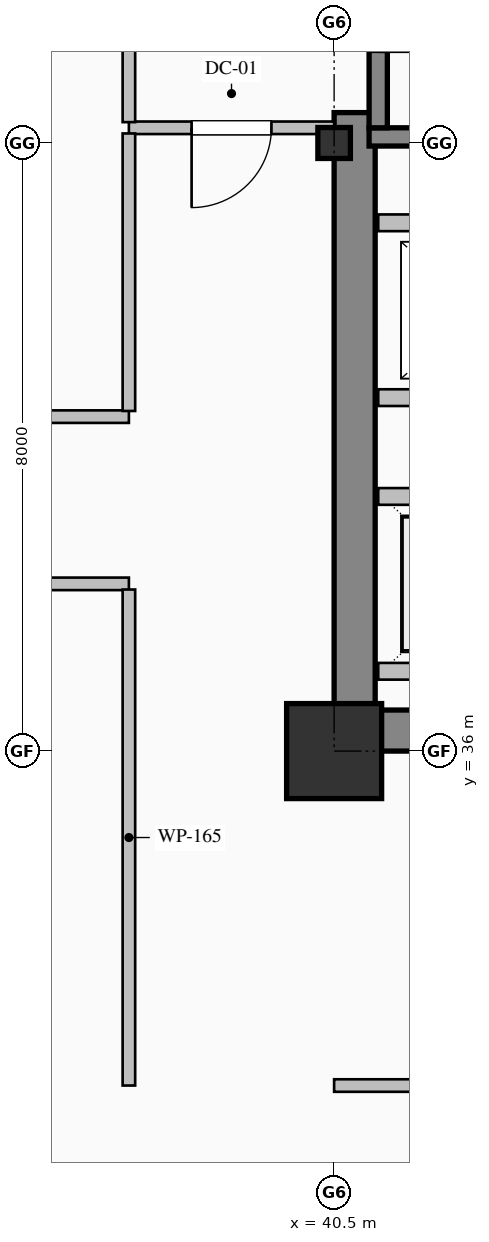
"""IFC4 building model, lengths in metres.
Left out: names, types, materials, properties, quantities, classifications, styles, units other than length and angle.
Written with IfcOpenShell. Run it as: python <this file> out.ifc"""

import sys

from ifc_helpers import new_model, si_unit, direction, frame, frame_2d, origin, origin_2d, place, context, subcontext, project, spatial, rectangle, hollow_rectangle, i_section, extrude, element, fill, save


model = new_model("IFC4")
c1 = context("Model", 3, precision=1e-05, world=origin(), true_north=direction((0.0, 1.0)))
c2 = subcontext(c1, "Body", "Model", "MODEL_VIEW")
j1 = project(units=[si_unit("LENGTHUNIT", "METRE"), si_unit("PLANEANGLEUNIT", "RADIAN")], contexts=[c1])
p1 = place(None, origin())
s1 = spatial("IfcSite", under=j1, at=p1, CompositionType="ELEMENT")
p2 = place(p1, origin())
s2 = spatial("IfcBuilding", under=s1, at=p2, CompositionType="ELEMENT")
p3 = place(p2, frame((0.0, 0.0, 32.2)))
s3 = spatial("IfcBuildingStorey", under=s2, at=p3, CompositionType="ELEMENT", Elevation=32.2)
p4 = place(p3, frame((40.77, 36.54, 0.0), z_axis=(0.0, 0.0, 1.0), x_axis=(0.0, 1.0, 0.0)))
e1 = element("IfcWall", 1, at=p4, inside=s3, PredefinedType="SHEAR", context=c2, shape_type="SweptSolid", body=[
    extrude(rectangle(XDim=7.86, YDim=0.54, at=frame_2d((3.93, 0.0))), origin(), (0.0, 0.0, 1.0), 3.75),
])
p5 = place(p3, frame((40.5, 36.27, 0.0), z_axis=(0.0, 0.0, 1.0), x_axis=(1.0, 0.0, 0.0)))
e2 = element("IfcWall", 2, at=p5, inside=s3, PredefinedType="SHEAR", context=c2, shape_type="SweptSolid", body=[
    extrude(rectangle(XDim=1.7, YDim=0.54, at=frame_2d((0.85, 0.0))), origin(), (0.0, 0.0, 1.0), 3.75),
])
p6 = place(p3, frame((40.5, 36.0, 0.0), z_axis=(0.0, 0.0, 1.0), x_axis=(1.0, 0.0, 0.0)))
e3 = element("IfcColumn", 3, at=p6, inside=s3, PredefinedType="COLUMN", context=c2, shape_type="SweptSolid", body=[
    extrude(hollow_rectangle(XDim=1.25, YDim=1.25, WallThickness=0.045, at=origin_2d()), origin(), (0.0, 0.0, 1.0), 4.0),
])
p7 = place(p3, frame((40.5, 44.0, 0.0), z_axis=(0.0, 0.0, 1.0), x_axis=(1.0, 0.0, 0.0)))
e4 = element("IfcColumn", 4, at=p7, inside=s3, PredefinedType="COLUMN", context=c2, shape_type="SweptSolid", body=[
    extrude(i_section(OverallWidth=0.407, OverallDepth=0.428, WebThickness=0.02, FlangeThickness=0.035, FilletRadius=0.022, at=origin_2d()), origin(), (0.0, 0.0, 1.0), 4.0),
])
p8 = place(p3, frame((49.04, 44.08, 0.0), z_axis=(0.0, 0.0, 1.0), x_axis=(-1.0, 0.0, 0.0)))
e5 = element("IfcWall", 5, at=p8, inside=s3, PredefinedType="SOLIDWALL", context=c2, shape_type="SweptSolid", body=[
    extrude(rectangle(XDim=8.08, YDim=0.24, at=frame_2d((4.04, 0.0))), origin(), (0.0, 0.0, 1.0), 4.0),
])
p9 = place(p3, frame((41.08, 47.35, 0.0), z_axis=(0.0, 0.0, 1.0), x_axis=(0.0, -1.0, 0.0)))
e6 = element("IfcWall", 6, at=p9, inside=s3, PredefinedType="SOLIDWALL", context=c2, shape_type="SweptSolid", body=[
    extrude(rectangle(XDim=3.15, YDim=0.24, at=frame_2d((1.575, 0.0))), origin(), (0.0, 0.0, 1.0), 4.0),
])
p10 = place(p9, frame((1.0, 0.0, 0.0)))
e7 = element("IfcOpeningElement", 7, at=p10, cuts=e6, PredefinedType="OPENING", context=c2, shape_type="SweptSolid", body=[
    extrude(rectangle(XDim=1.15, YDim=2.2, at=frame_2d((0.575, 1.1))), frame((0.0, 0.13, 0.0), z_axis=(0.0, -1.0, 0.0), x_axis=(1.0, 0.0, 0.0)), (0.0, 0.0, 1.0), 0.26),
])
p11 = place(p3, frame((49.32, 37.05, 0.0), z_axis=(0.0, 0.0, 1.0), x_axis=(-1.0, 0.0, 0.0)))
e8 = element("IfcWall", 8, at=p11, inside=s3, PredefinedType="PARTITIONING", context=c2, shape_type="SweptSolid", body=[
    extrude(rectangle(XDim=8.24, YDim=0.22, at=frame_2d((4.12, 0.0))), origin(), (0.0, 0.0, 1.0), 3.75),
])
p12 = place(p11, frame((6.37, 0.0, 0.0)))
e9 = element("IfcOpeningElement", 9, at=p12, cuts=e8, PredefinedType="OPENING", context=c2, shape_type="SweptSolid", body=[
    extrude(rectangle(XDim=1.1, YDim=2.2, at=frame_2d((0.55, 1.1))), frame((0.0, 0.12, 0.0), z_axis=(0.0, -1.0, 0.0), x_axis=(1.0, 0.0, 0.0)), (0.0, 0.0, 1.0), 0.24),
])
p13 = place(p11, frame((3.57, 0.0, 0.0)))
e10 = element("IfcOpeningElement", 10, at=p13, cuts=e8, PredefinedType="OPENING", context=c2, shape_type="SweptSolid", body=[
    extrude(rectangle(XDim=1.1, YDim=2.2, at=frame_2d((0.55, 1.1))), frame((0.0, 0.12, 0.0), z_axis=(0.0, -1.0, 0.0), x_axis=(1.0, 0.0, 0.0)), (0.0, 0.0, 1.0), 0.24),
])
p14 = place(p11, frame((0.77, 0.0, 0.0)))
e11 = element("IfcOpeningElement", 11, at=p14, cuts=e8, PredefinedType="OPENING", context=c2, shape_type="SweptSolid", body=[
    extrude(rectangle(XDim=1.1, YDim=2.2, at=frame_2d((0.55, 1.1))), frame((0.0, 0.12, 0.0), z_axis=(0.0, -1.0, 0.0), x_axis=(1.0, 0.0, 0.0)), (0.0, 0.0, 1.0), 0.24),
])
for number, where, z_axis, x_axis in (
    (12, (41.08, 39.35, 0.0), (0.0, 0.0, 1.0), (1.0, 0.0, 0.0)),
    (13, (49.32, 40.65, 0.0), (0.0, 0.0, 1.0), (-1.0, 0.0, 0.0)),
    (14, (41.08, 42.95, 0.0), (0.0, 0.0, 1.0), (1.0, 0.0, 0.0)),
):
    element("IfcWall", number, at=place(p3, frame(where, z_axis=z_axis, x_axis=x_axis)), inside=s3, PredefinedType="PARTITIONING", context=c2, shape_type="SweptSolid", body=[
        extrude(rectangle(XDim=8.24, YDim=0.22, at=frame_2d((4.12, 0.0))), origin(), (0.0, 0.0, 1.0), 3.75),
    ])
p15 = place(p3, frame((40.5, 44.2, 0.0), z_axis=(0.0, 0.0, 1.0), x_axis=(-1.0, 0.0, 0.0)))
e15 = element("IfcWall", 15, at=p15, inside=s3, PredefinedType="PARTITIONING", context=c2, shape_type="SweptSolid", body=[
    extrude(rectangle(XDim=2.7, YDim=0.165, at=frame_2d((1.35, 0.0))), origin(), (0.0, 0.0, 1.0), 3.75),
])
p16 = place(p15, frame((0.825, 0.0, 0.0)))
e16 = element("IfcOpeningElement", 16, at=p16, cuts=e15, PredefinedType="OPENING", context=c2, shape_type="SweptSolid", body=[
    extrude(rectangle(XDim=1.05, YDim=2.15, at=frame_2d((0.525, 1.075))), frame((0.0, 0.093, 0.0), z_axis=(0.0, -1.0, 0.0), x_axis=(1.0, 0.0, 0.0)), (0.0, 0.0, 1.0), 0.185),
])
p17 = place(p3, frame((37.8, 44.274, 0.0), z_axis=(0.0, 0.0, 1.0), x_axis=(0.0, 1.0, 0.0)))
e17 = element("IfcWall", 17, at=p17, inside=s3, PredefinedType="PARTITIONING", context=c2, shape_type="SweptSolid", body=[
    extrude(rectangle(XDim=3.051, YDim=0.165, at=frame_2d((1.525, 0.0))), origin(), (0.0, 0.0, 1.0), 3.75),
])
p18 = place(p3, frame((37.8, 38.2, 0.0), z_axis=(0.0, 0.0, 1.0), x_axis=(-1.0, 0.0, 0.0)))
e18 = element("IfcWall", 18, at=p18, inside=s3, PredefinedType="PARTITIONING", context=c2, shape_type="SweptSolid", body=[
    extrude(rectangle(XDim=28.8, YDim=0.165, at=frame_2d((14.4, 0.0))), origin(), (0.0, 0.0, 1.0), 3.75),
])
p19 = place(p18, frame((13.9, 0.0, 0.0)))
e19 = element("IfcOpeningElement", 19, at=p19, cuts=e18, PredefinedType="OPENING", context=c2, shape_type="SweptSolid", body=[
    extrude(rectangle(XDim=1.0, YDim=2.15, at=frame_2d((0.5, 1.075))), frame((0.0, 0.093, 0.0), z_axis=(0.0, -1.0, 0.0), x_axis=(1.0, 0.0, 0.0)), (0.0, 0.0, 1.0), 0.185),
])
p20 = place(p3, frame((32.5, 40.4, 0.0), z_axis=(0.0, 0.0, 1.0), x_axis=(1.0, 0.0, 0.0)))
e20 = element("IfcWall", 20, at=p20, inside=s3, PredefinedType="PARTITIONING", context=c2, shape_type="SweptSolid", body=[
    extrude(rectangle(XDim=5.3, YDim=0.165, at=frame_2d((2.65, 0.0))), origin(), (0.0, 0.0, 1.0), 3.75),
])
p21 = place(p20, frame((2.15, 0.0, 0.0)))
e21 = element("IfcOpeningElement", 21, at=p21, cuts=e20, PredefinedType="OPENING", context=c2, shape_type="SweptSolid", body=[
    extrude(rectangle(XDim=1.0, YDim=2.15, at=frame_2d((0.5, 1.075))), frame((0.0, 0.093, 0.0), z_axis=(0.0, -1.0, 0.0), x_axis=(1.0, 0.0, 0.0)), (0.0, 0.0, 1.0), 0.185),
])
p22 = place(p3, frame((37.8, 31.6, 0.0), z_axis=(0.0, 0.0, 1.0), x_axis=(0.0, 1.0, 0.0)))
e22 = element("IfcWall", 22, at=p22, inside=s3, PredefinedType="PARTITIONING", context=c2, shape_type="SweptSolid", body=[
    extrude(rectangle(XDim=6.525, YDim=0.165, at=frame_2d((3.263, 0.0))), origin(), (0.0, 0.0, 1.0), 3.75),
])
p23 = place(p3, frame((37.8, 40.475, 0.0), z_axis=(0.0, 0.0, 1.0), x_axis=(0.0, 1.0, 0.0)))
e23 = element("IfcWall", 23, at=p23, inside=s3, PredefinedType="PARTITIONING", context=c2, shape_type="SweptSolid", body=[
    extrude(rectangle(XDim=3.651, YDim=0.165, at=frame_2d((1.825, 0.0))), origin(), (0.0, 0.0, 1.0), 3.75),
])
p24 = place(p3, frame((43.0, 31.6, 0.0), z_axis=(0.0, 0.0, 1.0), x_axis=(-1.0, 0.0, 0.0)))
e24 = element("IfcWall", 24, at=p24, inside=s3, PredefinedType="PARTITIONING", context=c2, shape_type="SweptSolid", body=[
    extrude(rectangle(XDim=2.5, YDim=0.165, at=frame_2d((1.25, 0.0))), origin(), (0.0, 0.0, 1.0), 3.75),
])
p25 = place(p16, origin())
e25 = element("IfcDoor", 25, at=p25, inside=s3, OperationType="SINGLE_SWING_RIGHT", PredefinedType="DOOR", context=c2, shape_type="SweptSolid", body=[
    extrude(rectangle(XDim=1.05, YDim=2.15, at=frame_2d((0.525, 1.075))), frame((0.0, 0.025, 0.0), z_axis=(0.0, -1.0, 0.0), x_axis=(1.0, 0.0, 0.0)), (0.0, 0.0, 1.0), 0.05),
])
fill(e16, e25)
save(model, sys.argv[1])
